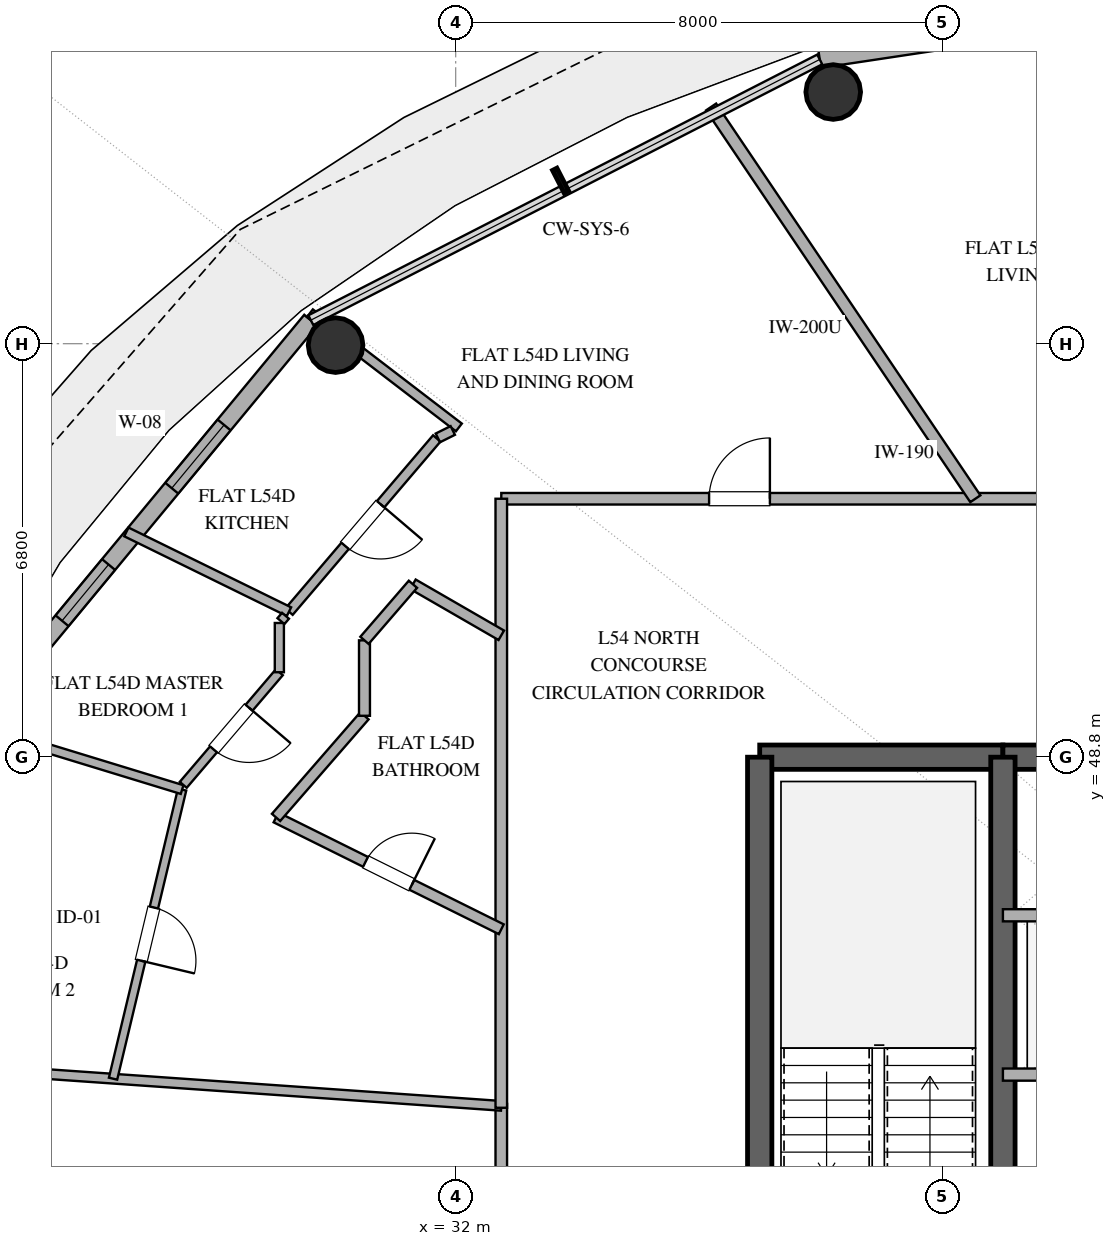
"""IFC4 building model, lengths in metres.
Left out: names, types, materials, properties, quantities, classifications, styles, units other than length and angle.
Written with IfcOpenShell. Run it as: python <this file> out.ifc"""

import sys

from ifc_helpers import new_model, si_unit, direction, frame, frame_2d, origin, origin_2d, place, context, subcontext, project, spatial, rectangle, hollow_circle, extrude, element, fill, save


model = new_model("IFC4")
c1 = context("Model", 3, precision=1e-05, world=origin(), true_north=direction((0.0, 1.0)))
c2 = subcontext(c1, "Body", "Model", "MODEL_VIEW")
j1 = project(units=[si_unit("LENGTHUNIT", "METRE"), si_unit("PLANEANGLEUNIT", "RADIAN")], contexts=[c1])
p1 = place(None, origin())
s1 = spatial("IfcSite", under=j1, at=p1, CompositionType="ELEMENT")
p2 = place(p1, origin())
s2 = spatial("IfcBuilding", under=s1, at=p2, CompositionType="ELEMENT")
p3 = place(p2, frame((0.0, 0.0, 213.6)))
s3 = spatial("IfcBuildingStorey", under=s2, at=p3, CompositionType="ELEMENT", Elevation=213.6)
p4 = place(p3, frame((37.0, 48.8, 0.0), z_axis=(0.0, 0.0, 1.0), x_axis=(1.0, 0.0, 0.0)))
e1 = element("IfcWall", 1, at=p4, inside=s3, PredefinedType="SHEAR", context=c2, shape_type="SweptSolid", body=[
    extrude(rectangle(XDim=4.0, YDim=0.4, at=frame_2d((2.0, 0.0))), origin(), (0.0, 0.0, 1.0), 3.36),
])
p5 = place(p3, frame((41.0, 48.8, 0.0), z_axis=(0.0, 0.0, 1.0), x_axis=(1.0, 0.0, 0.0)))
e2 = element("IfcWall", 2, at=p5, inside=s3, PredefinedType="SHEAR", context=c2, shape_type="SweptSolid", body=[
    extrude(rectangle(XDim=14.0, YDim=0.4, at=frame_2d((7.0, 0.0))), origin(), (0.0, 0.0, 1.0), 3.36),
])
p6 = place(p5, frame((6.1, 0.0, 0.0)))
e3 = element("IfcOpeningElement", 3, at=p6, cuts=e2, PredefinedType="OPENING", context=c2, shape_type="SweptSolid", body=[
    extrude(rectangle(XDim=1.8, YDim=2.25, at=frame_2d((0.9, 1.125))), frame((0.0, 0.21, 0.0), z_axis=(0.0, -1.0, 0.0), x_axis=(1.0, 0.0, 0.0)), (0.0, 0.0, 1.0), 0.42),
])
p7 = place(p3, frame((37.0, 35.2, 0.0), z_axis=(0.0, 0.0, 1.0), x_axis=(0.0, 1.0, 0.0)))
e4 = element("IfcWall", 4, at=p7, inside=s3, PredefinedType="SHEAR", context=c2, shape_type="SweptSolid", body=[
    extrude(rectangle(XDim=13.6, YDim=0.4, at=frame_2d((6.8, 0.0))), origin(), (0.0, 0.0, 1.0), 3.36),
])
p8 = place(p3, frame((41.0, 35.2, 0.0), z_axis=(0.0, 0.0, 1.0), x_axis=(0.0, 1.0, 0.0)))
e5 = element("IfcWall", 5, at=p8, inside=s3, PredefinedType="SHEAR", context=c2, shape_type="SweptSolid", body=[
    extrude(rectangle(XDim=13.6, YDim=0.4, at=frame_2d((6.8, 0.0))), origin(), (0.0, 0.0, 1.0), 3.36),
])
p9 = place(p8, frame((1.15, 0.0, 0.0)))
e6 = element("IfcOpeningElement", 6, at=p9, cuts=e5, PredefinedType="OPENING", context=c2, shape_type="SweptSolid", body=[
    extrude(rectangle(XDim=1.1, YDim=2.2, at=frame_2d((0.55, 1.1))), frame((0.0, 0.21, 0.0), z_axis=(0.0, -1.0, 0.0), x_axis=(1.0, 0.0, 0.0)), (0.0, 0.0, 1.0), 0.42),
])
for number, where, z_axis, x_axis in (
    (7, (38.209, 59.739, 0.0), (0.0, 0.0, 1.0), (1.0, 0.0, 0.0)),
    (8, (30.025, 55.576, 0.0), (0.0, 0.0, 1.0), (1.0, 0.0, 0.0)),
):
    element("IfcColumn", number, at=place(p3, frame(where, z_axis=z_axis, x_axis=x_axis)), inside=s3, PredefinedType="COLUMN", context=c2, shape_type="SweptSolid", body=[
        extrude(hollow_circle(Radius=0.45, WallThickness=0.025, at=origin_2d()), origin(), (0.0, 0.0, 1.0), 3.36),
    ])
p10 = place(p3, frame((48.0, 61.78, 0.0), z_axis=(0.0, 0.0, 1.0), x_axis=(-0.988882522213, -0.148698881169, 0.0)))
e9 = element("IfcWall", 9, at=p10, inside=s3, PredefinedType="SOLIDWALL", context=c2, shape_type="SweptSolid", body=[
    extrude(rectangle(XDim=10.125, YDim=0.28, at=frame_2d((5.062, 0.0))), origin(), (0.0, 0.0, 1.0), 3.36),
])
p11 = place(p10, frame((1.516, 0.0, 0.0)))
e10 = element("IfcOpeningElement", 10, at=p11, cuts=e9, PredefinedType="OPENING", context=c2, shape_type="SweptSolid", body=[
    extrude(rectangle(XDim=1.05, YDim=2.2, at=frame_2d((0.525, 1.1))), frame((0.0, 0.15, 0.0), z_axis=(0.0, -1.0, 0.0), x_axis=(1.0, 0.0, 0.0)), (0.0, 0.0, 1.0), 0.3),
])
p12 = place(p10, frame((4.422, 0.0, 0.85)))
e11 = element("IfcOpeningElement", 11, at=p12, cuts=e9, PredefinedType="OPENING", context=c2, shape_type="SweptSolid", body=[
    extrude(rectangle(XDim=1.5, YDim=1.8, at=frame_2d((0.75, 0.9))), frame((0.0, 0.15, 0.0), z_axis=(0.0, -1.0, 0.0), x_axis=(1.0, 0.0, 0.0)), (0.0, 0.0, 1.0), 0.3),
])
p13 = place(p10, frame((6.504, 0.0, 0.85)))
e12 = element("IfcOpeningElement", 12, at=p13, cuts=e9, PredefinedType="OPENING", context=c2, shape_type="SweptSolid", body=[
    extrude(rectangle(XDim=1.5, YDim=1.8, at=frame_2d((0.75, 0.9))), frame((0.0, 0.15, 0.0), z_axis=(0.0, -1.0, 0.0), x_axis=(1.0, 0.0, 0.0)), (0.0, 0.0, 1.0), 0.3),
])
p14 = place(p3, frame((29.617, 55.987, 0.0), z_axis=(0.0, 0.0, 1.0), x_axis=(-0.63761509934, -0.770355103243, 0.0)))
e13 = element("IfcWall", 13, at=p14, inside=s3, PredefinedType="SOLIDWALL", context=c2, shape_type="SweptSolid", body=[
    extrude(rectangle(XDim=8.33, YDim=0.28, at=frame_2d((4.165, 0.0))), origin(), (0.0, 0.0, 1.0), 3.36),
])
p15 = place(p14, frame((2.237, 0.0, 0.85)))
e14 = element("IfcOpeningElement", 14, at=p15, cuts=e13, PredefinedType="OPENING", context=c2, shape_type="SweptSolid", body=[
    extrude(rectangle(XDim=1.35, YDim=1.8, at=frame_2d((0.675, 0.9))), frame((0.0, 0.15, 0.0), z_axis=(0.0, -1.0, 0.0), x_axis=(1.0, 0.0, 0.0)), (0.0, 0.0, 1.0), 0.3),
])
p16 = place(p14, frame((5.217, 0.0, 0.85)))
e15 = element("IfcOpeningElement", 15, at=p16, cuts=e13, PredefinedType="OPENING", context=c2, shape_type="SweptSolid", body=[
    extrude(rectangle(XDim=1.2, YDim=1.8, at=frame_2d((0.6, 0.9))), frame((0.0, 0.15, 0.0), z_axis=(0.0, -1.0, 0.0), x_axis=(1.0, 0.0, 0.0)), (0.0, 0.0, 1.0), 0.3),
])
for number, where, z_axis, x_axis in (
    (16, (41.0, 46.2, 0.0), (0.0, 0.0, 1.0), (1.0, 0.0, 0.0)),
    (17, (41.0, 43.58, 0.0), (0.0, 0.0, 1.0), (1.0, 0.0, 0.0)),
):
    element("IfcWall", number, at=place(p3, frame(where, z_axis=z_axis, x_axis=x_axis)), inside=s3, PredefinedType="SOLIDWALL", context=c2, shape_type="SweptSolid", body=[
        extrude(rectangle(XDim=2.95, YDim=0.2, at=frame_2d((1.475, 0.0))), origin(), (0.0, 0.0, 1.0), 2.72),
    ])
p17 = place(p3, frame((32.75, 53.05, 0.0), z_axis=(0.0, 0.0, 1.0), x_axis=(1.0, 0.0, 0.0)))
e18 = element("IfcWall", 18, at=p17, inside=s3, PredefinedType="PARTITIONING", context=c2, shape_type="SweptSolid", body=[
    extrude(rectangle(XDim=13.247, YDim=0.19, at=frame_2d((6.623, 0.0))), origin(), (0.0, 0.0, 1.0), 2.72),
])
p18 = place(p17, frame((3.417, 0.0, 0.0)))
e19 = element("IfcOpeningElement", 19, at=p18, cuts=e18, PredefinedType="OPENING", context=c2, shape_type="SweptSolid", body=[
    extrude(rectangle(XDim=1.0, YDim=2.2, at=frame_2d((0.5, 1.1))), frame((0.0, 0.105, 0.0), z_axis=(0.0, -1.0, 0.0), x_axis=(1.0, 0.0, 0.0)), (0.0, 0.0, 1.0), 0.21),
])
p19 = place(p17, frame((10.002, 0.0, 0.0)))
e20 = element("IfcOpeningElement", 20, at=p19, cuts=e18, PredefinedType="OPENING", context=c2, shape_type="SweptSolid", body=[
    extrude(rectangle(XDim=1.0, YDim=2.2, at=frame_2d((0.5, 1.1))), frame((0.0, 0.105, 0.0), z_axis=(0.0, -1.0, 0.0), x_axis=(1.0, 0.0, 0.0)), (0.0, 0.0, 1.0), 0.21),
])
p20 = place(p3, frame((40.547, 53.05, 0.0), z_axis=(0.0, 0.0, 1.0), x_axis=(-0.559208454265, 0.8290270832, 0.0)))
e21 = element("IfcWall", 21, at=p20, inside=s3, PredefinedType="PARTITIONING", context=c2, shape_type="SweptSolid", body=[
    extrude(rectangle(XDim=7.771, YDim=0.2, at=frame_2d((3.886, 0.0))), origin(), (0.0, 0.0, 1.0), 2.72),
])
p21 = place(p3, frame((32.75, 30.95, 0.0), z_axis=(0.0, 0.0, 1.0), x_axis=(0.0, 1.0, 0.0)))
e22 = element("IfcWall", 22, at=p21, inside=s3, PredefinedType="PARTITIONING", context=c2, shape_type="SweptSolid", body=[
    extrude(rectangle(XDim=12.148, YDim=0.19, at=frame_2d((6.074, 0.0))), origin(), (0.0, 0.0, 1.0), 2.72),
])
p22 = place(p21, frame((3.214, 0.0, 0.0)))
e23 = element("IfcOpeningElement", 23, at=p22, cuts=e22, PredefinedType="OPENING", context=c2, shape_type="SweptSolid", body=[
    extrude(rectangle(XDim=1.0, YDim=2.2, at=frame_2d((0.5, 1.1))), frame((0.0, 0.105, 0.0), z_axis=(0.0, -1.0, 0.0), x_axis=(1.0, 0.0, 0.0)), (0.0, 0.0, 1.0), 0.21),
])
p23 = place(p3, frame((22.839, 43.76, 0.0), z_axis=(0.0, 0.0, 1.0), x_axis=(0.997563620801, -0.069762615023, 0.0)))
e24 = element("IfcWall", 24, at=p23, inside=s3, PredefinedType="PLUMBINGWALL", context=c2, shape_type="SweptSolid", body=[
    extrude(rectangle(XDim=9.935, YDim=0.16, at=frame_2d((4.968, 0.0))), origin(), (0.0, 0.0, 1.0), 2.72),
])
p24 = place(p3, frame((32.75, 43.034, 0.0), z_axis=(0.0, 0.0, 1.0), x_axis=(0.0, 1.0, 0.0)))
e25 = element("IfcWall", 25, at=p24, inside=s3, PredefinedType="PARTITIONING", context=c2, shape_type="SweptSolid", body=[
    extrude(rectangle(XDim=10.016, YDim=0.19, at=frame_2d((5.008, 0.0))), origin(), (0.0, 0.0, 1.0), 2.72),
])
p25 = place(p3, frame((27.5, 48.267, 0.0), z_axis=(0.0, 0.0, 1.0), x_axis=(-0.232297954947, -0.972644673109, 0.0)))
e26 = element("IfcWall", 26, at=p25, inside=s3, PredefinedType="PARTITIONING", context=c2, shape_type="SweptSolid", body=[
    extrude(rectangle(XDim=4.888, YDim=0.14, at=frame_2d((2.444, 0.0))), origin(), (0.0, 0.0, 1.0), 2.72),
])
p26 = place(p25, frame((1.994, 0.0, 0.0)))
e27 = element("IfcOpeningElement", 27, at=p26, cuts=e26, PredefinedType="OPENING", context=c2, shape_type="SweptSolid", body=[
    extrude(rectangle(XDim=0.9, YDim=2.1, at=frame_2d((0.45, 1.05))), frame((0.0, 0.08, 0.0), z_axis=(0.0, -1.0, 0.0), x_axis=(1.0, 0.0, 0.0)), (0.0, 0.0, 1.0), 0.16),
])
p27 = place(p3, frame((29.046, 47.809, 0.0), z_axis=(0.0, 0.0, 1.0), x_axis=(0.895675225239, -0.444708770876, 0.0)))
e28 = element("IfcWall", 28, at=p27, inside=s3, PredefinedType="PLUMBINGWALL", context=c2, shape_type="SweptSolid", body=[
    extrude(rectangle(XDim=4.135, YDim=0.18, at=frame_2d((2.068, 0.0))), origin(), (0.0, 0.0, 1.0), 2.72),
])
p28 = place(p27, frame((1.643, 0.0, 0.0)))
e29 = element("IfcOpeningElement", 29, at=p28, cuts=e28, PredefinedType="OPENING", context=c2, shape_type="SweptSolid", body=[
    extrude(rectangle(XDim=0.85, YDim=2.1, at=frame_2d((0.425, 1.05))), frame((0.0, 0.1, 0.0), z_axis=(0.0, -1.0, 0.0), x_axis=(1.0, 0.0, 0.0)), (0.0, 0.0, 1.0), 0.2),
])
p29 = place(p3, frame((31.689, 54.042, 0.0), z_axis=(0.0, 0.0, 1.0), x_axis=(-0.648996547252, -0.760791352248, 0.0)))
e30 = element("IfcWall", 30, at=p29, inside=s3, PredefinedType="PLUMBINGWALL", context=c2, shape_type="SweptSolid", body=[
    extrude(rectangle(XDim=3.745, YDim=0.16, at=frame_2d((1.873, 0.0))), origin(), (0.0, 0.0, 1.0), 2.72),
])
p30 = place(p29, frame((1.423, 0.0, 0.0)))
e31 = element("IfcOpeningElement", 31, at=p30, cuts=e30, PredefinedType="OPENING", context=c2, shape_type="SweptSolid", body=[
    extrude(rectangle(XDim=0.9, YDim=2.1, at=frame_2d((0.45, 1.05))), frame((0.0, 0.09, 0.0), z_axis=(0.0, -1.0, 0.0), x_axis=(1.0, 0.0, 0.0)), (0.0, 0.0, 1.0), 0.18),
])
p31 = place(p3, frame((27.5, 48.267, 0.0), z_axis=(0.0, 0.0, 1.0), x_axis=(-0.956303289689, 0.292376500647, 0.0)))
e32 = element("IfcWall", 32, at=p31, inside=s3, PredefinedType="PARTITIONING", context=c2, shape_type="SweptSolid", body=[
    extrude(rectangle(XDim=3.534, YDim=0.15, at=frame_2d((1.767, 0.0))), origin(), (0.0, 0.0, 1.0), 2.72),
])
p32 = place(p3, frame((29.603, 56.101, 0.0), z_axis=(0.0, 0.0, 1.0), x_axis=(0.793701828105, -0.608307001491, 0.0)))
e33 = element("IfcWall", 33, at=p32, inside=s3, PredefinedType="PLUMBINGWALL", context=c2, shape_type="SweptSolid", body=[
    extrude(rectangle(XDim=3.087, YDim=0.16, at=frame_2d((1.543, 0.0))), origin(), (0.0, 0.0, 1.0), 2.72),
])
p33 = place(p3, frame((29.258, 51.193, 0.0), z_axis=(0.0, 0.0, 1.0), x_axis=(-0.897810810902, 0.440381366348, 0.0)))
e34 = element("IfcWall", 34, at=p33, inside=s3, PredefinedType="PLUMBINGWALL", context=c2, shape_type="SweptSolid", body=[
    extrude(rectangle(XDim=2.979, YDim=0.16, at=frame_2d((1.489, 0.0))), origin(), (0.0, 0.0, 1.0), 2.72),
])
p34 = place(p3, frame((29.1, 50.197, 0.0), z_axis=(0.0, 0.0, 1.0), x_axis=(-0.649270866973, -0.760557257082, 0.0)))
e35 = element("IfcWall", 35, at=p34, inside=s3, PredefinedType="PARTITIONING", context=c2, shape_type="SweptSolid", body=[
    extrude(rectangle(XDim=2.435, YDim=0.15, at=frame_2d((1.218, 0.0))), origin(), (0.0, 0.0, 1.0), 2.72),
])
p35 = place(p34, frame((0.768, 0.0, 0.0)))
e36 = element("IfcOpeningElement", 36, at=p35, cuts=e35, PredefinedType="OPENING", context=c2, shape_type="SweptSolid", body=[
    extrude(rectangle(XDim=0.9, YDim=2.1, at=frame_2d((0.45, 1.05))), frame((0.0, 0.085, 0.0), z_axis=(0.0, -1.0, 0.0), x_axis=(1.0, 0.0, 0.0)), (0.0, 0.0, 1.0), 0.17),
])
p36 = place(p3, frame((30.5, 49.481, 0.0), z_axis=(0.0, 0.0, 1.0), x_axis=(-0.656364223854, -0.754444169998, 0.0)))
e37 = element("IfcWall", 37, at=p36, inside=s3, PredefinedType="PLUMBINGWALL", context=c2, shape_type="SweptSolid", body=[
    extrude(rectangle(XDim=2.215, YDim=0.18, at=frame_2d((1.108, 0.0))), origin(), (0.0, 0.0, 1.0), 2.72),
])
p37 = place(p3, frame((32.75, 50.805, 0.0), z_axis=(0.0, 0.0, 1.0), x_axis=(-0.866013522419, 0.500020578564, 0.0)))
e38 = element("IfcWall", 38, at=p37, inside=s3, PredefinedType="PLUMBINGWALL", context=c2, shape_type="SweptSolid", body=[
    extrude(rectangle(XDim=1.678, YDim=0.18, at=frame_2d((0.839, 0.0))), origin(), (0.0, 0.0, 1.0), 2.72),
])
p38 = place(p3, frame((30.5, 50.721, 0.0), z_axis=(0.0, 0.0, 1.0), x_axis=(0.0, -1.0, 0.0)))
e39 = element("IfcWall", 39, at=p38, inside=s3, PredefinedType="PLUMBINGWALL", context=c2, shape_type="SweptSolid", body=[
    extrude(rectangle(XDim=1.24, YDim=0.18, at=frame_2d((0.62, 0.0))), origin(), (0.0, 0.0, 1.0), 2.72),
])
p39 = place(p3, frame((31.297, 51.644, 0.0), z_axis=(0.0, 0.0, 1.0), x_axis=(-0.653870108477, -0.756606820773, 0.0)))
e40 = element("IfcWall", 40, at=p39, inside=s3, PredefinedType="PLUMBINGWALL", context=c2, shape_type="SweptSolid", body=[
    extrude(rectangle(XDim=1.219, YDim=0.18, at=frame_2d((0.609, 0.0))), origin(), (0.0, 0.0, 1.0), 2.72),
])
p40 = place(p3, frame((29.1, 51.007, 0.0), z_axis=(0.0, 0.0, 1.0), x_axis=(0.0, -1.0, 0.0)))
e41 = element("IfcWall", 41, at=p40, inside=s3, PredefinedType="PARTITIONING", context=c2, shape_type="SweptSolid", body=[
    extrude(rectangle(XDim=0.81, YDim=0.15, at=frame_2d((0.405, 0.0))), origin(), (0.0, 0.0, 1.0), 2.72),
])
p41 = place(p3, frame((31.952, 54.173, 0.0), z_axis=(0.0, 0.0, 1.0), x_axis=(-0.895316278345, -0.445430984251, 0.0)))
e42 = element("IfcWall", 42, at=p41, inside=s3, PredefinedType="PLUMBINGWALL", context=c2, shape_type="SweptSolid", body=[
    extrude(rectangle(XDim=0.274, YDim=0.16, at=frame_2d((0.137, 0.0))), origin(), (0.0, 0.0, 1.0), 2.72),
])
p42 = place(p3, frame((29.201, 51.126, 0.0), z_axis=(0.0, 0.0, 1.0), x_axis=(-0.649232735888, -0.760589807092, 0.0)))
e43 = element("IfcWall", 43, at=p42, inside=s3, PredefinedType="PARTITIONING", context=c2, shape_type="SweptSolid", body=[
    extrude(rectangle(XDim=0.116, YDim=0.15, at=frame_2d((0.058, 0.0))), origin(), (0.0, 0.0, 1.0), 2.72),
])
p43 = place(p15, origin())
e44 = element("IfcWindow", 44, at=p43, inside=s3, PartitioningType="SINGLE_PANEL", PredefinedType="WINDOW", context=c2, shape_type="SweptSolid", body=[
    extrude(rectangle(XDim=1.35, YDim=1.8, at=frame_2d((0.675, 0.9))), frame((0.0, 0.03, 0.0), z_axis=(0.0, -1.0, 0.0), x_axis=(1.0, 0.0, 0.0)), (0.0, 0.0, 1.0), 0.06),
])
fill(e14, e44)
p44 = place(p16, origin())
e45 = element("IfcWindow", 45, at=p44, inside=s3, PartitioningType="SINGLE_PANEL", PredefinedType="WINDOW", context=c2, shape_type="SweptSolid", body=[
    extrude(rectangle(XDim=1.2, YDim=1.8, at=frame_2d((0.6, 0.9))), frame((0.0, 0.03, 0.0), z_axis=(0.0, -1.0, 0.0), x_axis=(1.0, 0.0, 0.0)), (0.0, 0.0, 1.0), 0.06),
])
fill(e15, e45)
p45 = place(p18, origin())
e46 = element("IfcDoor", 46, at=p45, inside=s3, OperationType="SINGLE_SWING_RIGHT", PredefinedType="DOOR", context=c2, shape_type="SweptSolid", body=[
    extrude(rectangle(XDim=1.0, YDim=2.2, at=frame_2d((0.5, 1.1))), frame((0.0, 0.025, 0.0), z_axis=(0.0, -1.0, 0.0), x_axis=(1.0, 0.0, 0.0)), (0.0, 0.0, 1.0), 0.05),
])
fill(e19, e46)
p46 = place(p26, origin())
e47 = element("IfcDoor", 47, at=p46, inside=s3, OperationType="SINGLE_SWING_RIGHT", PredefinedType="DOOR", context=c2, shape_type="SweptSolid", body=[
    extrude(rectangle(XDim=0.9, YDim=2.1, at=frame_2d((0.45, 1.05))), frame((0.0, 0.025, 0.0), z_axis=(0.0, -1.0, 0.0), x_axis=(1.0, 0.0, 0.0)), (0.0, 0.0, 1.0), 0.05),
])
fill(e27, e47)
p47 = place(p28, origin())
e48 = element("IfcDoor", 48, at=p47, inside=s3, OperationType="SINGLE_SWING_RIGHT", PredefinedType="DOOR", context=c2, shape_type="SweptSolid", body=[
    extrude(rectangle(XDim=0.85, YDim=2.1, at=frame_2d((0.425, 1.05))), frame((0.0, 0.025, 0.0), z_axis=(0.0, -1.0, 0.0), x_axis=(1.0, 0.0, 0.0)), (0.0, 0.0, 1.0), 0.05),
])
fill(e29, e48)
p48 = place(p30, origin())
e49 = element("IfcDoor", 49, at=p48, inside=s3, OperationType="SINGLE_SWING_LEFT", PredefinedType="DOOR", context=c2, shape_type="SweptSolid", body=[
    extrude(rectangle(XDim=0.9, YDim=2.1, at=frame_2d((0.45, 1.05))), frame((0.0, 0.025, 0.0), z_axis=(0.0, -1.0, 0.0), x_axis=(1.0, 0.0, 0.0)), (0.0, 0.0, 1.0), 0.05),
])
fill(e31, e49)
p49 = place(p35, origin())
e50 = element("IfcDoor", 50, at=p49, inside=s3, OperationType="SINGLE_SWING_LEFT", PredefinedType="DOOR", context=c2, shape_type="SweptSolid", body=[
    extrude(rectangle(XDim=0.9, YDim=2.1, at=frame_2d((0.45, 1.05))), frame((0.0, 0.025, 0.0), z_axis=(0.0, -1.0, 0.0), x_axis=(1.0, 0.0, 0.0)), (0.0, 0.0, 1.0), 0.05),
])
fill(e36, e50)
save(model, sys.argv[1])
